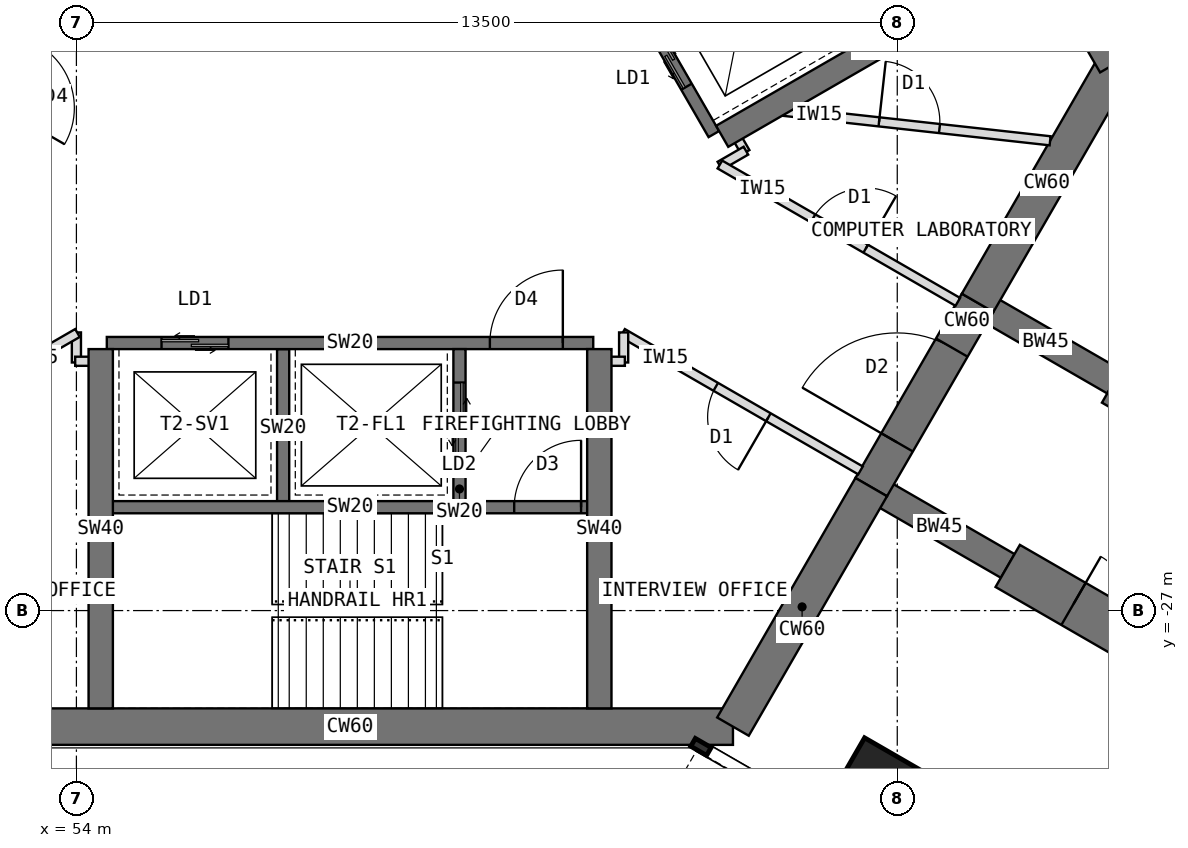
"""IFC4 building model, lengths in metres.
Left out: names, types, materials, properties, quantities, classifications, styles, units other than length and angle.
Written with IfcOpenShell. Run it as: python <this file> out.ifc"""

import sys

from ifc_helpers import new_model, si_unit, direction, frame, frame_2d, origin, origin_2d, place, context, subcontext, project, spatial, rectangle, extrude, element, fill, save


model = new_model("IFC4")
c1 = context("Model", 3, precision=1e-05, world=origin(), true_north=direction((0.0, 1.0)))
c2 = subcontext(c1, "Body", "Model", "MODEL_VIEW")
j1 = project(units=[si_unit("LENGTHUNIT", "METRE"), si_unit("PLANEANGLEUNIT", "RADIAN")], contexts=[c1])
p1 = place(None, origin())
s1 = spatial("IfcSite", under=j1, at=p1, CompositionType="ELEMENT")
p2 = place(p1, origin())
s2 = spatial("IfcBuilding", under=s1, at=p2, CompositionType="ELEMENT")
p3 = place(p2, frame((0.0, 0.0, 145.5)))
s3 = spatial("IfcBuildingStorey", under=s2, at=p3, CompositionType="ELEMENT", Elevation=145.5)
p4 = place(p3, frame((52.202, -28.908, 0.0), z_axis=(0.0, 0.0, 1.0), x_axis=(1.0, 0.0, 0.0)))
e1 = element("IfcWall", 1, at=p4, inside=s3, PredefinedType="SHEAR", context=c2, shape_type="SweptSolid", body=[
    extrude(rectangle(XDim=12.596, YDim=0.6, at=frame_2d((6.298, 0.0))), origin(), (0.0, 0.0, 1.0), 4.0),
])
p5 = place(p3, frame((64.798, -28.908, 0.0), z_axis=(0.0, 0.0, 1.0), x_axis=(0.499984222037, 0.866034513004, 0.0)))
e2 = element("IfcWall", 2, at=p5, inside=s3, PredefinedType="SHEAR", context=c2, shape_type="SweptSolid", body=[
    extrude(rectangle(XDim=4.548, YDim=0.6, at=frame_2d((2.274, 0.0))), origin(), (0.0, 0.0, 1.0), 4.0),
])
p6 = place(p3, frame((67.072, -24.97, 0.0), z_axis=(0.0, 0.0, 1.0), x_axis=(0.500010275428, 0.866019471182, 0.0)))
e3 = element("IfcWall", 3, at=p6, inside=s3, PredefinedType="SHEAR", context=c2, shape_type="SweptSolid", body=[
    extrude(rectangle(XDim=3.5, YDim=0.6, at=frame_2d((1.75, 0.0))), origin(), (0.0, 0.0, 1.0), 4.0),
])
p7 = place(p6, frame((0.85, 0.0, 0.0)))
e4 = element("IfcOpeningElement", 4, at=p7, cuts=e3, PredefinedType="OPENING", context=c2, shape_type="SweptSolid", body=[
    extrude(rectangle(XDim=1.8, YDim=2.1, at=frame_2d((0.9, 1.05))), frame((0.0, 0.31, 0.0), z_axis=(0.0, -1.0, 0.0), x_axis=(1.0, 0.0, 0.0)), (0.0, 0.0, 1.0), 0.62),
])
p8 = place(p3, frame((68.822, -21.939, 0.0), z_axis=(0.0, 0.0, 1.0), x_axis=(0.500024481964, 0.866011268655, 0.0)))
e5 = element("IfcWall", 5, at=p8, inside=s3, PredefinedType="SHEAR", context=c2, shape_type="SweptSolid", body=[
    extrude(rectangle(XDim=4.548, YDim=0.6, at=frame_2d((2.274, 0.0))), origin(), (0.0, 0.0, 1.0), 4.0),
])
p9 = place(p3, frame((71.096, -18.0, 0.0), z_axis=(0.0, 0.0, 1.0), x_axis=(-0.500005998175, 0.866021940709, 0.0)))
e6 = element("IfcWall", 6, at=p9, inside=s3, PredefinedType="SHEAR", context=c2, shape_type="SweptSolid", body=[
    extrude(rectangle(XDim=12.596, YDim=0.6, at=frame_2d((6.298, 0.0))), origin(), (0.0, 0.0, 1.0), 4.0),
])
p10 = place(p3, frame((68.822, -21.939, 0.0), z_axis=(0.0, 0.0, 1.0), x_axis=(0.866072649678, -0.499918158782, 0.0)))
e7 = element("IfcWall", 7, at=p10, inside=s3, PredefinedType="SHEAR", context=c2, shape_type="SweptSolid", body=[
    extrude(rectangle(XDim=2.592, YDim=0.45, at=frame_2d((1.296, 0.0))), origin(), (0.0, 0.0, 1.0), 4.0),
])
p11 = place(p3, frame((71.066, -23.234, 0.0), z_axis=(0.0, 0.0, 1.0), x_axis=(0.86602681393, -0.499997557548, 0.0)))
e8 = element("IfcWall", 8, at=p11, inside=s3, PredefinedType="SHEAR", context=c2, shape_type="SweptSolid", body=[
    extrude(rectangle(XDim=9.5, YDim=0.8, at=frame_2d((4.75, 0.0))), origin(), (0.0, 0.0, 1.0), 4.0),
])
p12 = place(p11, frame((1.25, 0.0, 0.0)))
e9 = element("IfcOpeningElement", 9, at=p12, cuts=e8, PredefinedType="OPENING", context=c2, shape_type="SweptSolid", body=[
    extrude(rectangle(XDim=0.9, YDim=2.1, at=frame_2d((0.45, 1.05))), frame((0.0, 0.41, 0.0), z_axis=(0.0, -1.0, 0.0), x_axis=(1.0, 0.0, 0.0)), (0.0, 0.0, 1.0), 0.82),
])
p13 = place(p3, frame((67.072, -24.97, 0.0), z_axis=(0.0, 0.0, 1.0), x_axis=(0.866031863473, -0.499988811324, 0.0)))
e10 = element("IfcWall", 10, at=p13, inside=s3, PredefinedType="SHEAR", context=c2, shape_type="SweptSolid", body=[
    extrude(rectangle(XDim=2.592, YDim=0.45, at=frame_2d((1.296, 0.0))), origin(), (0.0, 0.0, 1.0), 4.0),
])
p14 = place(p3, frame((69.316, -26.266, 0.0), z_axis=(0.0, 0.0, 1.0), x_axis=(0.86602681393, -0.499997557548, 0.0)))
e11 = element("IfcWall", 11, at=p14, inside=s3, PredefinedType="SHEAR", context=c2, shape_type="SweptSolid", body=[
    extrude(rectangle(XDim=9.5, YDim=0.8, at=frame_2d((4.75, 0.0))), origin(), (0.0, 0.0, 1.0), 4.0),
])
p15 = place(p14, frame((1.25, 0.0, 0.0)))
e12 = element("IfcOpeningElement", 12, at=p15, cuts=e11, PredefinedType="OPENING", context=c2, shape_type="SweptSolid", body=[
    extrude(rectangle(XDim=0.9, YDim=2.1, at=frame_2d((0.45, 1.05))), frame((0.0, 0.41, 0.0), z_axis=(0.0, -1.0, 0.0), x_axis=(1.0, 0.0, 0.0)), (0.0, 0.0, 1.0), 0.82),
])
p16 = place(p3, frame((67.191, -29.946, 0.0), z_axis=(0.0, 0.0, 1.0), x_axis=(0.5, 0.866025403784, 0.0)))
e13 = element("IfcColumn", 13, at=p16, inside=s3, PredefinedType="COLUMN", context=c2, shape_type="SweptSolid", body=[
    extrude(rectangle(XDim=1.25, YDim=1.25, at=origin_2d()), origin(), (0.0, 0.0, 1.0), 4.0),
])
p17 = place(p3, frame((56.516, -12.236, 0.0), z_axis=(0.0, 0.0, 1.0), x_axis=(-0.49999894854, -0.866026010844, 0.0)))
e14 = element("IfcWall", 14, at=p17, inside=s3, PredefinedType="SHEAR", context=c2, shape_type="SweptSolid", body=[
    extrude(rectangle(XDim=8.0, YDim=0.2, at=frame_2d((4.0, 0.0))), origin(), (0.0, 0.0, 1.0), 4.0),
])
p18 = place(p17, frame((6.3, 0.0, 0.0)))
e15 = element("IfcOpeningElement", 15, at=p18, cuts=e14, PredefinedType="OPENING", context=c2, shape_type="SweptSolid", body=[
    extrude(rectangle(XDim=1.2, YDim=2.1, at=frame_2d((0.6, 1.05))), frame((0.0, 0.11, 0.0), z_axis=(0.0, -1.0, 0.0), x_axis=(1.0, 0.0, 0.0)), (0.0, 0.0, 1.0), 0.22),
])
p19 = place(p3, frame((54.178, -10.886, 0.0), z_axis=(0.0, 0.0, 1.0), x_axis=(-0.49999894854, -0.866026010844, 0.0)))
e16 = element("IfcWall", 16, at=p19, inside=s3, PredefinedType="SHEAR", context=c2, shape_type="SweptSolid", body=[
    extrude(rectangle(XDim=8.0, YDim=0.2, at=frame_2d((4.0, 0.0))), origin(), (0.0, 0.0, 1.0), 4.0),
])
p20 = place(p19, frame((6.8, 0.0, 0.0)))
e17 = element("IfcOpeningElement", 17, at=p20, cuts=e16, PredefinedType="OPENING", context=c2, shape_type="SweptSolid", body=[
    extrude(rectangle(XDim=0.9, YDim=2.1, at=frame_2d((0.45, 1.05))), frame((0.0, 0.11, 0.0), z_axis=(0.0, -1.0, 0.0), x_axis=(1.0, 0.0, 0.0)), (0.0, 0.0, 1.0), 0.22),
])
p21 = place(p3, frame((54.5, -22.6, 0.0), z_axis=(0.0, 0.0, 1.0), x_axis=(1.0, 0.0, 0.0)))
e18 = element("IfcWall", 18, at=p21, inside=s3, PredefinedType="SHEAR", context=c2, shape_type="SweptSolid", body=[
    extrude(rectangle(XDim=8.0, YDim=0.2, at=frame_2d((4.0, 0.0))), origin(), (0.0, 0.0, 1.0), 4.0),
])
p22 = place(p21, frame((6.3, 0.0, 0.0)))
e19 = element("IfcOpeningElement", 19, at=p22, cuts=e18, PredefinedType="OPENING", context=c2, shape_type="SweptSolid", body=[
    extrude(rectangle(XDim=1.2, YDim=2.1, at=frame_2d((0.6, 1.05))), frame((0.0, 0.11, 0.0), z_axis=(0.0, -1.0, 0.0), x_axis=(1.0, 0.0, 0.0)), (0.0, 0.0, 1.0), 0.22),
])
p23 = place(p21, frame((0.9, 0.0, 0.0)))
e20 = element("IfcOpeningElement", 20, at=p23, cuts=e18, PredefinedType="OPENING", context=c2, shape_type="SweptSolid", body=[
    extrude(rectangle(XDim=1.1, YDim=2.2, at=frame_2d((0.55, 1.1))), frame((0.0, 0.11, 0.0), z_axis=(0.0, -1.0, 0.0), x_axis=(1.0, 0.0, 0.0)), (0.0, 0.0, 1.0), 0.22),
])
p24 = place(p3, frame((57.4, -22.7, 0.0), z_axis=(0.0, 0.0, 1.0), x_axis=(0.0, -1.0, 0.0)))
e21 = element("IfcWall", 21, at=p24, inside=s3, PredefinedType="SHEAR", context=c2, shape_type="SweptSolid", body=[
    extrude(rectangle(XDim=2.6, YDim=0.2, at=frame_2d((1.3, 0.0))), origin(), (0.0, 0.0, 1.0), 4.0),
])
p25 = place(p3, frame((60.3, -22.7, 0.0), z_axis=(0.0, 0.0, 1.0), x_axis=(0.0, -1.0, 0.0)))
e22 = element("IfcWall", 22, at=p25, inside=s3, PredefinedType="SHEAR", context=c2, shape_type="SweptSolid", body=[
    extrude(rectangle(XDim=2.6, YDim=0.2, at=frame_2d((1.3, 0.0))), origin(), (0.0, 0.0, 1.0), 4.0),
])
p26 = place(p25, frame((0.55, 0.0, 0.0)))
e23 = element("IfcOpeningElement", 23, at=p26, cuts=e22, PredefinedType="OPENING", context=c2, shape_type="SweptSolid", body=[
    extrude(rectangle(XDim=1.3, YDim=2.2, at=frame_2d((0.65, 1.1))), frame((0.0, 0.11, 0.0), z_axis=(0.0, -1.0, 0.0), x_axis=(1.0, 0.0, 0.0)), (0.0, 0.0, 1.0), 0.22),
])
p27 = place(p3, frame((54.5, -25.3, 0.0), z_axis=(0.0, 0.0, 1.0), x_axis=(1.0, 0.0, 0.0)))
e24 = element("IfcWall", 24, at=p27, inside=s3, PredefinedType="SHEAR", context=c2, shape_type="SweptSolid", body=[
    extrude(rectangle(XDim=8.0, YDim=0.2, at=frame_2d((4.0, 0.0))), origin(), (0.0, 0.0, 1.0), 4.0),
])
p28 = place(p27, frame((6.7, 0.0, 0.0)))
e25 = element("IfcOpeningElement", 25, at=p28, cuts=e24, PredefinedType="OPENING", context=c2, shape_type="SweptSolid", body=[
    extrude(rectangle(XDim=1.1, YDim=2.1, at=frame_2d((0.55, 1.05))), frame((0.0, 0.11, 0.0), z_axis=(0.0, -1.0, 0.0), x_axis=(1.0, 0.0, 0.0)), (0.0, 0.0, 1.0), 0.22),
])
for number, where, z_axis, x_axis in (
    (26, (62.6, -22.7, 0.0), (0.0, 0.0, 1.0), (0.0, -1.0, 0.0)),
    (27, (54.4, -22.7, 0.0), (0.0, 0.0, 1.0), (0.0, -1.0, 0.0)),
):
    element("IfcWall", number, at=place(p3, frame(where, z_axis=z_axis, x_axis=x_axis)), inside=s3, PredefinedType="SHEAR", context=c2, shape_type="SweptSolid", body=[
        extrude(rectangle(XDim=5.908, YDim=0.4, at=frame_2d((2.954, 0.0))), origin(), (0.0, 0.0, 1.0), 4.0),
    ])
p29 = place(p3, frame((64.484, -19.164, 0.0), z_axis=(0.0, 0.0, 1.0), x_axis=(-0.49999894854, 0.866026010844, 0.0)))
e28 = element("IfcWall", 28, at=p29, inside=s3, PredefinedType="SHEAR", context=c2, shape_type="SweptSolid", body=[
    extrude(rectangle(XDim=8.0, YDim=0.2, at=frame_2d((4.0, 0.0))), origin(), (0.0, 0.0, 1.0), 4.0),
])
p30 = place(p29, frame((6.3, 0.0, 0.0)))
e29 = element("IfcOpeningElement", 29, at=p30, cuts=e28, PredefinedType="OPENING", context=c2, shape_type="SweptSolid", body=[
    extrude(rectangle(XDim=1.2, YDim=2.1, at=frame_2d((0.6, 1.05))), frame((0.0, 0.11, 0.0), z_axis=(0.0, -1.0, 0.0), x_axis=(1.0, 0.0, 0.0)), (0.0, 0.0, 1.0), 0.22),
])
p31 = place(p29, frame((0.9, 0.0, 0.0)))
e30 = element("IfcOpeningElement", 30, at=p31, cuts=e28, PredefinedType="OPENING", context=c2, shape_type="SweptSolid", body=[
    extrude(rectangle(XDim=1.1, YDim=2.2, at=frame_2d((0.55, 1.1))), frame((0.0, 0.11, 0.0), z_axis=(0.0, -1.0, 0.0), x_axis=(1.0, 0.0, 0.0)), (0.0, 0.0, 1.0), 0.22),
])
p32 = place(p29, frame((3.8, 0.0, 0.0)))
e31 = element("IfcOpeningElement", 31, at=p32, cuts=e28, PredefinedType="OPENING", context=c2, shape_type="SweptSolid", body=[
    extrude(rectangle(XDim=1.1, YDim=2.2, at=frame_2d((0.55, 1.1))), frame((0.0, 0.11, 0.0), z_axis=(0.0, -1.0, 0.0), x_axis=(1.0, 0.0, 0.0)), (0.0, 0.0, 1.0), 0.22),
])
p33 = place(p3, frame((66.822, -17.814, 0.0), z_axis=(0.0, 0.0, 1.0), x_axis=(-0.49999894854, 0.866026010844, 0.0)))
e32 = element("IfcWall", 32, at=p33, inside=s3, PredefinedType="SHEAR", context=c2, shape_type="SweptSolid", body=[
    extrude(rectangle(XDim=8.0, YDim=0.2, at=frame_2d((4.0, 0.0))), origin(), (0.0, 0.0, 1.0), 4.0),
])
p34 = place(p33, frame((6.7, 0.0, 0.0)))
e33 = element("IfcOpeningElement", 33, at=p34, cuts=e32, PredefinedType="OPENING", context=c2, shape_type="SweptSolid", body=[
    extrude(rectangle(XDim=1.1, YDim=2.1, at=frame_2d((0.55, 1.05))), frame((0.0, 0.11, 0.0), z_axis=(0.0, -1.0, 0.0), x_axis=(1.0, 0.0, 0.0)), (0.0, 0.0, 1.0), 0.22),
])
p35 = place(p3, frame((64.62, -19.201, 0.0), z_axis=(0.0, 0.0, 1.0), x_axis=(0.866027317282, 0.49999668571, 0.0)))
e34 = element("IfcWall", 34, at=p35, inside=s3, PredefinedType="SHEAR", context=c2, shape_type="SweptSolid", body=[
    extrude(rectangle(XDim=5.908, YDim=0.4, at=frame_2d((2.954, 0.0))), origin(), (0.0, 0.0, 1.0), 4.0),
])
p36 = place(p3, frame((54.0, -22.92, 0.0), z_axis=(0.0, 0.0, 1.0), x_axis=(0.0, 1.0, 0.0)))
e35 = element("IfcWall", 35, at=p36, inside=s3, PredefinedType="PARTITIONING", context=c2, shape_type="SweptSolid", body=[
    extrude(rectangle(XDim=0.494, YDim=0.15, at=frame_2d((0.247, 0.0))), origin(), (0.0, 0.0, 1.0), 3.8),
])
p37 = place(p3, frame((54.017, -22.436, 0.0), z_axis=(0.0, 0.0, 1.0), x_axis=(-0.86602002524, -0.500009315796, 0.0)))
e36 = element("IfcWall", 36, at=p37, inside=s3, PredefinedType="PARTITIONING", context=c2, shape_type="SweptSolid", body=[
    extrude(rectangle(XDim=4.519, YDim=0.15, at=frame_2d((2.259, 0.0))), origin(), (0.0, 0.0, 1.0), 3.8),
])
p38 = place(p37, frame((1.769, 0.0, 0.0)))
e37 = element("IfcOpeningElement", 37, at=p38, cuts=e36, PredefinedType="OPENING", context=c2, shape_type="SweptSolid", body=[
    extrude(rectangle(XDim=1.0, YDim=2.1, at=frame_2d((0.5, 1.05))), frame((0.0, 0.085, 0.0), z_axis=(0.0, -1.0, 0.0), x_axis=(1.0, 0.0, 0.0)), (0.0, 0.0, 1.0), 0.17),
])
p39 = place(p3, frame((64.789, -19.092, 0.0), z_axis=(0.0, 0.0, 1.0), x_axis=(0.499804398801, -0.866138304741, 0.0)))
e38 = element("IfcWall", 38, at=p39, inside=s3, PredefinedType="PARTITIONING", context=c2, shape_type="SweptSolid", body=[
    extrude(rectangle(XDim=0.43, YDim=0.15, at=frame_2d((0.215, 0.0))), origin(), (0.0, 0.0, 1.0), 3.8),
])
p40 = place(p3, frame((65.011, -19.437, 0.0), z_axis=(0.0, 0.0, 1.0), x_axis=(-0.865831790172, -0.50033519877, 0.0)))
e39 = element("IfcWall", 39, at=p40, inside=s3, PredefinedType="PARTITIONING", context=c2, shape_type="SweptSolid", body=[
    extrude(rectangle(XDim=0.494, YDim=0.15, at=frame_2d((0.247, 0.0))), origin(), (0.0, 0.0, 1.0), 3.8),
])
p41 = place(p3, frame((64.583, -19.664, 0.0), z_axis=(0.0, 0.0, 1.0), x_axis=(0.866006515865, -0.500032713409, 0.0)))
e40 = element("IfcWall", 40, at=p41, inside=s3, PredefinedType="PARTITIONING", context=c2, shape_type="SweptSolid", body=[
    extrude(rectangle(XDim=4.518, YDim=0.15, at=frame_2d((2.259, 0.0))), origin(), (0.0, 0.0, 1.0), 3.8),
])
p42 = place(p41, frame((1.769, 0.0, 0.0)))
e41 = element("IfcOpeningElement", 41, at=p42, cuts=e40, PredefinedType="OPENING", context=c2, shape_type="SweptSolid", body=[
    extrude(rectangle(XDim=1.0, YDim=2.1, at=frame_2d((0.5, 1.05))), frame((0.0, 0.085, 0.0), z_axis=(0.0, -1.0, 0.0), x_axis=(1.0, 0.0, 0.0)), (0.0, 0.0, 1.0), 0.17),
])
p43 = place(p3, frame((66.896, -24.695, 0.0), z_axis=(0.0, 0.0, 1.0), x_axis=(-0.86602002524, 0.500009315796, 0.0)))
e42 = element("IfcWall", 42, at=p43, inside=s3, PredefinedType="PARTITIONING", context=c2, shape_type="SweptSolid", body=[
    extrude(rectangle(XDim=4.519, YDim=0.15, at=frame_2d((2.259, 0.0))), origin(), (0.0, 0.0, 1.0), 3.8),
])
p44 = place(p43, frame((1.749, 0.0, 0.0)))
e43 = element("IfcOpeningElement", 43, at=p44, cuts=e42, PredefinedType="OPENING", context=c2, shape_type="SweptSolid", body=[
    extrude(rectangle(XDim=1.0, YDim=2.1, at=frame_2d((0.5, 1.05))), frame((0.0, 0.085, 0.0), z_axis=(0.0, -1.0, 0.0), x_axis=(1.0, 0.0, 0.0)), (0.0, 0.0, 1.0), 0.17),
])
p45 = place(p3, frame((63.0, -22.426, 0.0), z_axis=(0.0, 0.0, 1.0), x_axis=(0.0, -1.0, 0.0)))
e44 = element("IfcWall", 44, at=p45, inside=s3, PredefinedType="PARTITIONING", context=c2, shape_type="SweptSolid", body=[
    extrude(rectangle(XDim=0.494, YDim=0.15, at=frame_2d((0.247, 0.0))), origin(), (0.0, 0.0, 1.0), 3.8),
])
for number, where, z_axis, x_axis in (
    (45, (63.02, -22.9, 0.0), (0.0, 0.0, 1.0), (-1.0, 0.0, 0.0)),
    (46, (54.41, -22.9, 0.0), (0.0, 0.0, 1.0), (-1.0, 0.0, 0.0)),
):
    element("IfcWall", number, at=place(p3, frame(where, z_axis=z_axis, x_axis=x_axis)), inside=s3, PredefinedType="PARTITIONING", context=c2, shape_type="SweptSolid", body=[
        extrude(rectangle(XDim=0.43, YDim=0.15, at=frame_2d((0.215, 0.0))), origin(), (0.0, 0.0, 1.0), 3.8),
    ])
p46 = place(p3, frame((65.381, -18.761, 0.0), z_axis=(0.0, 0.0, 1.0), x_axis=(0.993932184458, -0.109994603044, 0.0)))
e47 = element("IfcWall", 47, at=p46, inside=s3, PredefinedType="PARTITIONING", context=c2, shape_type="SweptSolid", body=[
    extrude(rectangle(XDim=4.661, YDim=0.15, at=frame_2d((2.331, 0.0))), origin(), (0.0, 0.0, 1.0), 3.8),
])
p47 = place(p46, frame((1.831, 0.0, 0.0)))
e48 = element("IfcOpeningElement", 48, at=p47, cuts=e47, PredefinedType="OPENING", context=c2, shape_type="SweptSolid", body=[
    extrude(rectangle(XDim=1.0, YDim=2.1, at=frame_2d((0.5, 1.05))), frame((0.0, 0.085, 0.0), z_axis=(0.0, -1.0, 0.0), x_axis=(1.0, 0.0, 0.0)), (0.0, 0.0, 1.0), 0.17),
])
p48 = place(p22, origin())
e49 = element("IfcDoor", 49, at=p48, inside=s3, OperationType="SINGLE_SWING_RIGHT", PredefinedType="DOOR", context=c2, shape_type="SweptSolid", body=[
    extrude(rectangle(XDim=1.2, YDim=2.1, at=frame_2d((0.6, 1.05))), frame((0.0, 0.025, 0.0), z_axis=(0.0, -1.0, 0.0), x_axis=(1.0, 0.0, 0.0)), (0.0, 0.0, 1.0), 0.05),
])
fill(e19, e49)
p49 = place(p26, origin())
e50 = element("IfcDoor", 50, at=p49, inside=s3, OperationType="DOUBLE_DOOR_SLIDING", PredefinedType="DOOR", context=c2, shape_type="SweptSolid", body=[
    extrude(rectangle(XDim=1.3, YDim=2.2, at=frame_2d((0.65, 1.1))), frame((0.0, 0.025, 0.0), z_axis=(0.0, -1.0, 0.0), x_axis=(1.0, 0.0, 0.0)), (0.0, 0.0, 1.0), 0.05),
])
fill(e23, e50)
p50 = place(p23, origin())
e51 = element("IfcDoor", 51, at=p50, inside=s3, OperationType="DOUBLE_DOOR_SLIDING", PredefinedType="DOOR", context=c2, shape_type="SweptSolid", body=[
    extrude(rectangle(XDim=1.1, YDim=2.2, at=frame_2d((0.55, 1.1))), frame((0.0, 0.025, 0.0), z_axis=(0.0, -1.0, 0.0), x_axis=(1.0, 0.0, 0.0)), (0.0, 0.0, 1.0), 0.05),
])
fill(e20, e51)
p51 = place(p28, origin())
e52 = element("IfcDoor", 52, at=p51, inside=s3, OperationType="SINGLE_SWING_RIGHT", PredefinedType="DOOR", context=c2, shape_type="SweptSolid", body=[
    extrude(rectangle(XDim=1.1, YDim=2.1, at=frame_2d((0.55, 1.05))), frame((0.0, 0.025, 0.0), z_axis=(0.0, -1.0, 0.0), x_axis=(1.0, 0.0, 0.0)), (0.0, 0.0, 1.0), 0.05),
])
fill(e25, e52)
p52 = place(p31, origin())
e53 = element("IfcDoor", 53, at=p52, inside=s3, OperationType="DOUBLE_DOOR_SLIDING", PredefinedType="DOOR", context=c2, shape_type="SweptSolid", body=[
    extrude(rectangle(XDim=1.1, YDim=2.2, at=frame_2d((0.55, 1.1))), frame((0.0, 0.025, 0.0), z_axis=(0.0, -1.0, 0.0), x_axis=(1.0, 0.0, 0.0)), (0.0, 0.0, 1.0), 0.05),
])
fill(e30, e53)
p53 = place(p7, origin())
e54 = element("IfcDoor", 54, at=p53, inside=s3, OperationType="DOUBLE_DOOR_DOUBLE_SWING", PredefinedType="DOOR", context=c2, shape_type="SweptSolid", body=[
    extrude(rectangle(XDim=1.72, YDim=2.06, at=frame_2d((0.9, 1.03))), frame((0.0, 0.025, 0.0), z_axis=(0.0, -1.0, 0.0), x_axis=(1.0, 0.0, 0.0)), (0.0, 0.0, 1.0), 0.05),
    extrude(rectangle(XDim=0.04, YDim=2.1, at=frame_2d((0.02, 1.05))), frame((0.0, 0.3, 0.0), z_axis=(0.0, -1.0, 0.0), x_axis=(1.0, 0.0, 0.0)), (0.0, 0.0, 1.0), 0.6),
    extrude(rectangle(XDim=0.04, YDim=2.1, at=frame_2d((1.78, 1.05))), frame((0.0, 0.3, 0.0), z_axis=(0.0, -1.0, 0.0), x_axis=(1.0, 0.0, 0.0)), (0.0, 0.0, 1.0), 0.6),
    extrude(rectangle(XDim=1.72, YDim=0.04, at=frame_2d((0.9, 2.08))), frame((0.0, 0.3, 0.0), z_axis=(0.0, -1.0, 0.0), x_axis=(1.0, 0.0, 0.0)), (0.0, 0.0, 1.0), 0.6),
])
fill(e4, e54)
p54 = place(p44, origin())
e55 = element("IfcDoor", 55, at=p54, inside=s3, OperationType="SINGLE_SWING_LEFT", PredefinedType="DOOR", context=c2, shape_type="SweptSolid", body=[
    extrude(rectangle(XDim=1.0, YDim=2.1, at=frame_2d((0.5, 1.05))), frame((0.0, 0.025, 0.0), z_axis=(0.0, -1.0, 0.0), x_axis=(1.0, 0.0, 0.0)), (0.0, 0.0, 1.0), 0.05),
])
fill(e43, e55)
p55 = place(p42, origin())
e56 = element("IfcDoor", 56, at=p55, inside=s3, OperationType="SINGLE_SWING_RIGHT", PredefinedType="DOOR", context=c2, shape_type="SweptSolid", body=[
    extrude(rectangle(XDim=1.0, YDim=2.1, at=frame_2d((0.5, 1.05))), frame((0.0, 0.025, 0.0), z_axis=(0.0, -1.0, 0.0), x_axis=(1.0, 0.0, 0.0)), (0.0, 0.0, 1.0), 0.05),
])
fill(e41, e56)
p56 = place(p47, origin())
e57 = element("IfcDoor", 57, at=p56, inside=s3, OperationType="SINGLE_SWING_LEFT", PredefinedType="DOOR", context=c2, shape_type="SweptSolid", body=[
    extrude(rectangle(XDim=1.0, YDim=2.1, at=frame_2d((0.5, 1.05))), frame((0.0, 0.025, 0.0), z_axis=(0.0, -1.0, 0.0), x_axis=(1.0, 0.0, 0.0)), (0.0, 0.0, 1.0), 0.05),
])
fill(e48, e57)
p57 = place(p15, origin())
e58 = element("IfcDoor", 58, at=p57, inside=s3, OperationType="SINGLE_SWING_LEFT", PredefinedType="DOOR", context=c2, shape_type="SweptSolid", body=[
    extrude(rectangle(XDim=0.82, YDim=2.06, at=frame_2d((0.45, 1.03))), frame((0.0, 0.025, 0.0), z_axis=(0.0, -1.0, 0.0), x_axis=(1.0, 0.0, 0.0)), (0.0, 0.0, 1.0), 0.05),
    extrude(rectangle(XDim=0.04, YDim=2.1, at=frame_2d((0.02, 1.05))), frame((0.0, 0.4, 0.0), z_axis=(0.0, -1.0, 0.0), x_axis=(1.0, 0.0, 0.0)), (0.0, 0.0, 1.0), 0.8),
    extrude(rectangle(XDim=0.04, YDim=2.1, at=frame_2d((0.88, 1.05))), frame((0.0, 0.4, 0.0), z_axis=(0.0, -1.0, 0.0), x_axis=(1.0, 0.0, 0.0)), (0.0, 0.0, 1.0), 0.8),
    extrude(rectangle(XDim=0.82, YDim=0.04, at=frame_2d((0.45, 2.08))), frame((0.0, 0.4, 0.0), z_axis=(0.0, -1.0, 0.0), x_axis=(1.0, 0.0, 0.0)), (0.0, 0.0, 1.0), 0.8),
])
fill(e12, e58)
save(model, sys.argv[1])
